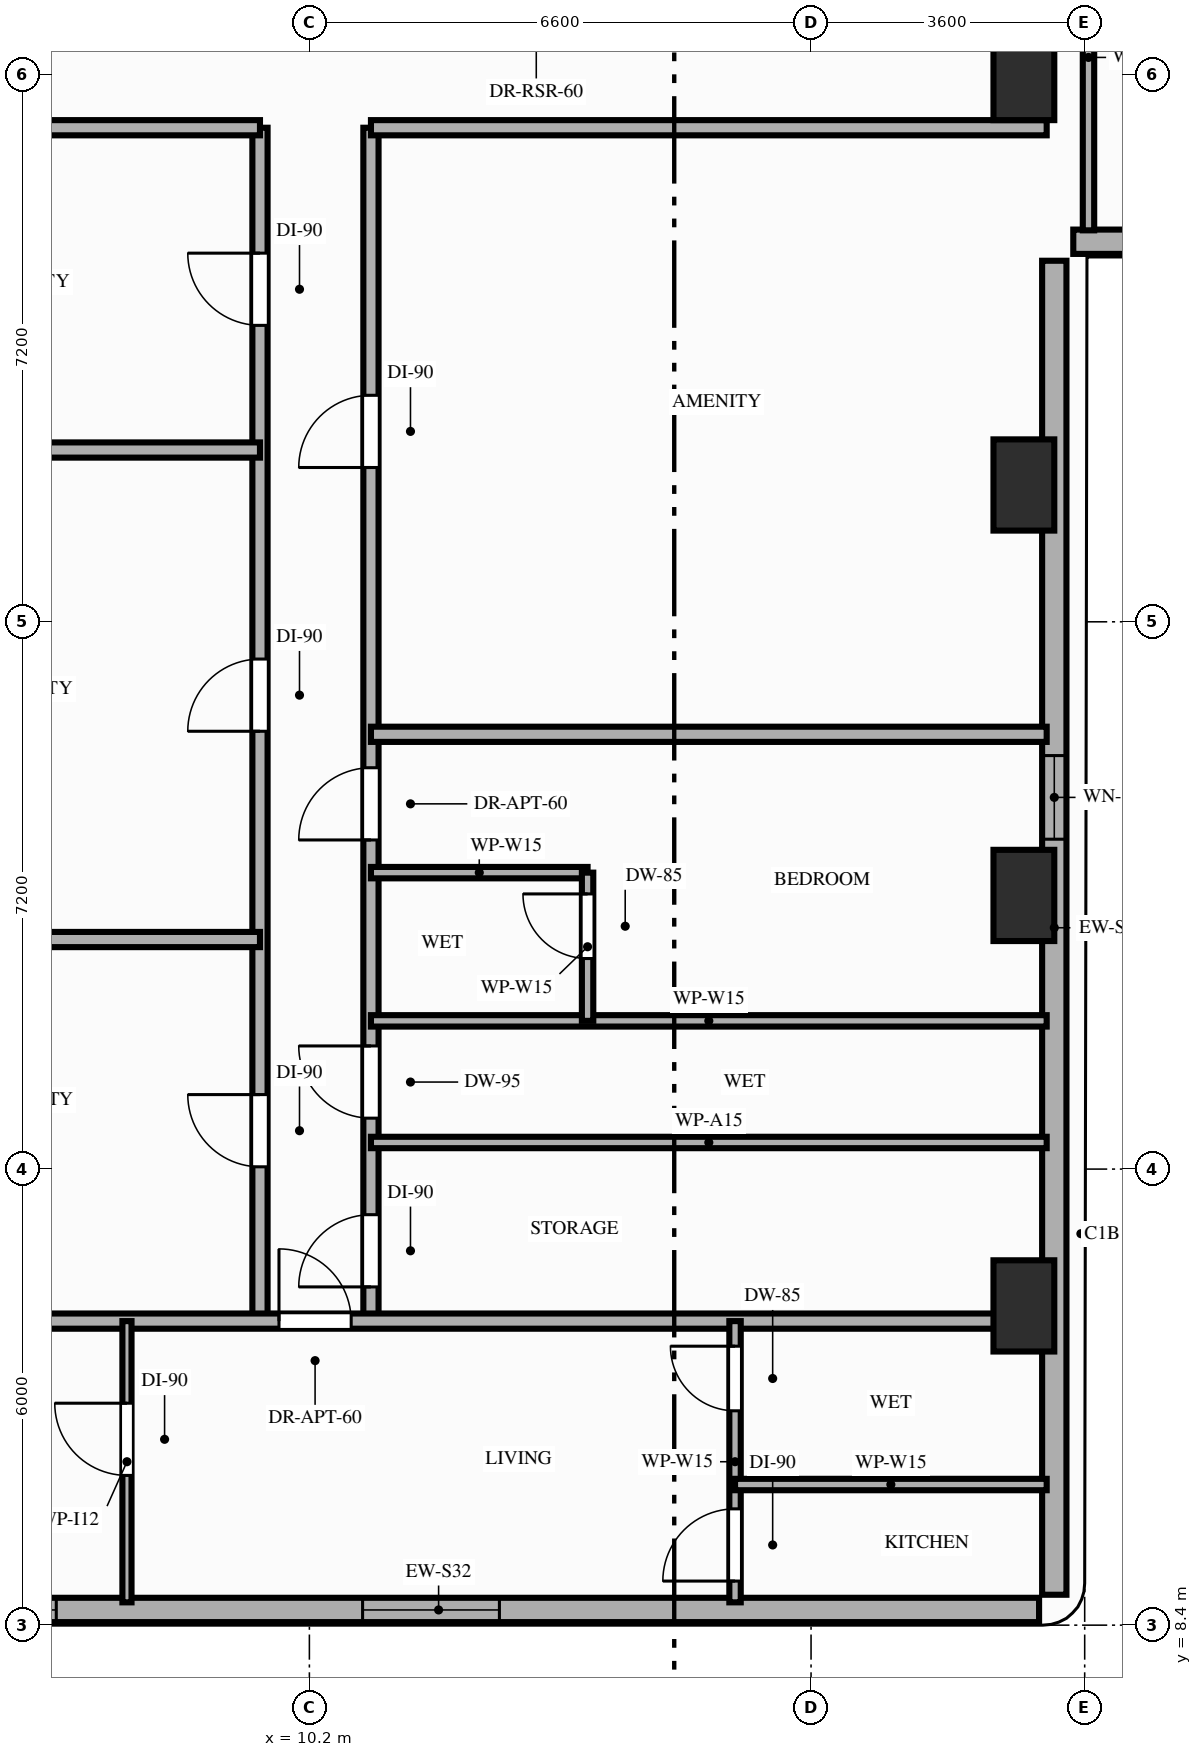
"""IFC4 building model, lengths in metres.
Left out: names, types, materials, properties, quantities, classifications, styles, units other than length and angle.
Written with IfcOpenShell. Run it as: python <this file> out.ifc"""

import sys

from ifc_helpers import new_model, si_unit, direction, frame, frame_2d, origin, origin_2d, place, context, subcontext, project, spatial, rectangle, extrude, element, fill, save


model = new_model("IFC4")
c1 = context("Model", 3, precision=1e-05, world=origin(), true_north=direction((0.0, 1.0)))
c2 = subcontext(c1, "Body", "Model", "MODEL_VIEW")
j1 = project(units=[si_unit("LENGTHUNIT", "METRE"), si_unit("PLANEANGLEUNIT", "RADIAN")], contexts=[c1])
p1 = place(None, origin())
s1 = spatial("IfcSite", under=j1, at=p1, CompositionType="ELEMENT")
p2 = place(p1, origin())
s2 = spatial("IfcBuilding", under=s1, at=p2, CompositionType="ELEMENT")
p3 = place(p2, frame((0.0, 0.0, 102.6)))
s3 = spatial("IfcBuildingStorey", under=s2, at=p3, CompositionType="ELEMENT", Elevation=102.6)
for number, where, z_axis, x_axis in (
    (1, (19.6, 12.6, 0.0), (0.0, 0.0, 1.0), (1.0, 0.0, 0.0)),
    (2, (19.6, 18.0, 0.0), (0.0, 0.0, 1.0), (1.0, 0.0, 0.0)),
    (3, (19.6, 23.4, 0.0), (0.0, 0.0, 1.0), (1.0, 0.0, 0.0)),
    (4, (19.6, 28.8, 0.0), (0.0, 0.0, 1.0), (1.0, 0.0, 0.0)),
):
    element("IfcColumn", number, at=place(p3, frame(where, z_axis=z_axis, x_axis=x_axis)), inside=s3, PredefinedType="COLUMN", context=c2, shape_type="SweptSolid", body=[
        extrude(rectangle(XDim=0.8, YDim=1.2, at=origin_2d()), origin(), (0.0, 0.0, 1.0), 4.8),
    ])
p4 = place(p3, frame((4.0, 8.6, 0.0), z_axis=(0.0, 0.0, 1.0), x_axis=(1.0, 0.0, 0.0)))
e5 = element("IfcWall", 5, at=p4, inside=s3, PredefinedType="STANDARD", context=c2, shape_type="SweptSolid", body=[
    extrude(rectangle(XDim=15.8, YDim=0.32, at=frame_2d((7.9, 0.0))), origin(), (0.0, 0.0, 1.0), 4.56),
])
p5 = place(p4, frame((1.07, 0.0, 0.85)))
e6 = element("IfcOpeningElement", 6, at=p5, cuts=e5, PredefinedType="OPENING", context=c2, shape_type="SweptSolid", body=[
    extrude(rectangle(XDim=1.8, YDim=1.75, at=frame_2d((0.9, 0.875))), frame((0.0, 0.17, 0.0), z_axis=(0.0, -1.0, 0.0), x_axis=(1.0, 0.0, 0.0)), (0.0, 0.0, 1.0), 0.34),
])
p6 = place(p4, frame((6.9, 0.0, 0.85)))
e7 = element("IfcOpeningElement", 7, at=p6, cuts=e5, PredefinedType="OPENING", context=c2, shape_type="SweptSolid", body=[
    extrude(rectangle(XDim=1.8, YDim=1.75, at=frame_2d((0.9, 0.875))), frame((0.0, 0.17, 0.0), z_axis=(0.0, -1.0, 0.0), x_axis=(1.0, 0.0, 0.0)), (0.0, 0.0, 1.0), 0.34),
])
p7 = place(p3, frame((20.0, 8.8, 0.0), z_axis=(0.0, 0.0, 1.0), x_axis=(0.0, 1.0, 0.0)))
e8 = element("IfcWall", 8, at=p7, inside=s3, PredefinedType="STANDARD", context=c2, shape_type="SweptSolid", body=[
    extrude(rectangle(XDim=17.55, YDim=0.32, at=frame_2d((8.775, 0.0))), origin(), (0.0, 0.0, 1.0), 3.95),
])
p8 = place(p7, frame((9.94, 0.0, 0.85)))
e9 = element("IfcOpeningElement", 9, at=p8, cuts=e8, PredefinedType="OPENING", context=c2, shape_type="SweptSolid", body=[
    extrude(rectangle(XDim=1.1, YDim=1.7, at=frame_2d((0.55, 0.85))), frame((0.0, 0.17, 0.0), z_axis=(0.0, -1.0, 0.0), x_axis=(1.0, 0.0, 0.0)), (0.0, 0.0, 1.0), 0.34),
])
p9 = place(p3, frame((20.25, 26.6, 0.0), z_axis=(0.0, 0.0, 1.0), x_axis=(1.0, 0.0, 0.0)))
e10 = element("IfcWall", 10, at=p9, inside=s3, PredefinedType="STANDARD", context=c2, shape_type="SweptSolid", body=[
    extrude(rectangle(XDim=26.15, YDim=0.32, at=frame_2d((13.075, 0.0))), origin(), (0.0, 0.0, 1.0), 4.26),
])
p10 = place(p9, frame((2.25, 0.0, 0.85)))
e11 = element("IfcOpeningElement", 11, at=p10, cuts=e10, PredefinedType="OPENING", context=c2, shape_type="SweptSolid", body=[
    extrude(rectangle(XDim=1.8, YDim=1.75, at=frame_2d((0.9, 0.875))), frame((0.0, 0.17, 0.0), z_axis=(0.0, -1.0, 0.0), x_axis=(1.0, 0.0, 0.0)), (0.0, 0.0, 1.0), 0.34),
])
p11 = place(p9, frame((7.75, 0.0, 0.85)))
e12 = element("IfcOpeningElement", 12, at=p11, cuts=e10, PredefinedType="OPENING", context=c2, shape_type="SweptSolid", body=[
    extrude(rectangle(XDim=1.8, YDim=1.75, at=frame_2d((0.9, 0.875))), frame((0.0, 0.17, 0.0), z_axis=(0.0, -1.0, 0.0), x_axis=(1.0, 0.0, 0.0)), (0.0, 0.0, 1.0), 0.34),
])
p12 = place(p9, frame((13.5, 0.0, 0.85)))
e13 = element("IfcOpeningElement", 13, at=p12, cuts=e10, PredefinedType="OPENING", context=c2, shape_type="SweptSolid", body=[
    extrude(rectangle(XDim=1.8, YDim=1.75, at=frame_2d((0.9, 0.875))), frame((0.0, 0.17, 0.0), z_axis=(0.0, -1.0, 0.0), x_axis=(1.0, 0.0, 0.0)), (0.0, 0.0, 1.0), 0.34),
])
p13 = place(p9, frame((22.25, 0.0, 0.85)))
e14 = element("IfcOpeningElement", 14, at=p13, cuts=e10, PredefinedType="OPENING", context=c2, shape_type="SweptSolid", body=[
    extrude(rectangle(XDim=1.8, YDim=1.75, at=frame_2d((0.9, 0.875))), frame((0.0, 0.17, 0.0), z_axis=(0.0, -1.0, 0.0), x_axis=(1.0, 0.0, 0.0)), (0.0, 0.0, 1.0), 0.34),
])
p14 = place(p3, frame((9.55, 12.4, 0.0), z_axis=(0.0, 0.0, 1.0), x_axis=(0.0, 1.0, 0.0)))
e15 = element("IfcWall", 15, at=p14, inside=s3, PredefinedType="PARTITIONING", context=c2, shape_type="SweptSolid", body=[
    extrude(rectangle(XDim=15.7, YDim=0.2, at=frame_2d((7.85, 0.0))), origin(), (0.0, 0.0, 1.0), 3.95),
])
p15 = place(p14, frame((2.03, 0.0, 0.0)))
e16 = element("IfcOpeningElement", 16, at=p15, cuts=e15, PredefinedType="OPENING", context=c2, shape_type="SweptSolid", body=[
    extrude(rectangle(XDim=0.95, YDim=2.15, at=frame_2d((0.475, 1.075))), frame((0.0, 0.11, 0.0), z_axis=(0.0, -1.0, 0.0), x_axis=(1.0, 0.0, 0.0)), (0.0, 0.0, 1.0), 0.22),
])
p16 = place(p14, frame((7.76, 0.0, 0.0)))
e17 = element("IfcOpeningElement", 17, at=p16, cuts=e15, PredefinedType="OPENING", context=c2, shape_type="SweptSolid", body=[
    extrude(rectangle(XDim=0.95, YDim=2.15, at=frame_2d((0.475, 1.075))), frame((0.0, 0.11, 0.0), z_axis=(0.0, -1.0, 0.0), x_axis=(1.0, 0.0, 0.0)), (0.0, 0.0, 1.0), 0.22),
])
p17 = place(p14, frame((13.1, 0.0, 0.0)))
e18 = element("IfcOpeningElement", 18, at=p17, cuts=e15, PredefinedType="OPENING", context=c2, shape_type="SweptSolid", body=[
    extrude(rectangle(XDim=0.95, YDim=2.15, at=frame_2d((0.475, 1.075))), frame((0.0, 0.11, 0.0), z_axis=(0.0, -1.0, 0.0), x_axis=(1.0, 0.0, 0.0)), (0.0, 0.0, 1.0), 0.22),
])
p18 = place(p3, frame((11.01, 12.4, 0.0), z_axis=(0.0, 0.0, 1.0), x_axis=(0.0, 1.0, 0.0)))
e19 = element("IfcWall", 19, at=p18, inside=s3, PredefinedType="PARTITIONING", context=c2, shape_type="SweptSolid", body=[
    extrude(rectangle(XDim=15.7, YDim=0.2, at=frame_2d((7.85, 0.0))), origin(), (0.0, 0.0, 1.0), 3.95),
])
p19 = place(p18, frame((0.45, 0.0, 0.0)))
e20 = element("IfcOpeningElement", 20, at=p19, cuts=e19, PredefinedType="OPENING", context=c2, shape_type="SweptSolid", body=[
    extrude(rectangle(XDim=0.95, YDim=2.15, at=frame_2d((0.475, 1.075))), frame((0.0, 0.11, 0.0), z_axis=(0.0, -1.0, 0.0), x_axis=(1.0, 0.0, 0.0)), (0.0, 0.0, 1.0), 0.22),
])
p20 = place(p18, frame((2.67, 0.0, 0.0)))
e21 = element("IfcOpeningElement", 21, at=p20, cuts=e19, PredefinedType="OPENING", context=c2, shape_type="SweptSolid", body=[
    extrude(rectangle(XDim=0.95, YDim=2.1, at=frame_2d((0.475, 1.05))), frame((0.0, 0.11, 0.0), z_axis=(0.0, -1.0, 0.0), x_axis=(1.0, 0.0, 0.0)), (0.0, 0.0, 1.0), 0.22),
])
p21 = place(p18, frame((11.23, 0.0, 0.0)))
e22 = element("IfcOpeningElement", 22, at=p21, cuts=e19, PredefinedType="OPENING", context=c2, shape_type="SweptSolid", body=[
    extrude(rectangle(XDim=0.95, YDim=2.15, at=frame_2d((0.475, 1.075))), frame((0.0, 0.11, 0.0), z_axis=(0.0, -1.0, 0.0), x_axis=(1.0, 0.0, 0.0)), (0.0, 0.0, 1.0), 0.22),
])
p22 = place(p18, frame((6.33, 0.0, 0.0)))
e23 = element("IfcOpeningElement", 23, at=p22, cuts=e19, PredefinedType="OPENING", context=c2, shape_type="SweptSolid", body=[
    extrude(rectangle(XDim=0.95, YDim=2.15, at=frame_2d((0.475, 1.075))), frame((0.0, 0.11, 0.0), z_axis=(0.0, -1.0, 0.0), x_axis=(1.0, 0.0, 0.0)), (0.0, 0.0, 1.0), 0.22),
])
p23 = place(p3, frame((3.9, 12.4, 0.0), z_axis=(0.0, 0.0, 1.0), x_axis=(1.0, 0.0, 0.0)))
e24 = element("IfcWall", 24, at=p23, inside=s3, PredefinedType="PARTITIONING", context=c2, shape_type="SweptSolid", body=[
    extrude(rectangle(XDim=16.0, YDim=0.2, at=frame_2d((8.0, 0.0))), origin(), (0.0, 0.0, 1.0), 3.95),
])
p24 = place(p23, frame((5.9, 0.0, 0.0)))
e25 = element("IfcOpeningElement", 25, at=p24, cuts=e24, PredefinedType="OPENING", context=c2, shape_type="SweptSolid", body=[
    extrude(rectangle(XDim=0.95, YDim=2.15, at=frame_2d((0.475, 1.075))), frame((0.0, 0.11, 0.0), z_axis=(0.0, -1.0, 0.0), x_axis=(1.0, 0.0, 0.0)), (0.0, 0.0, 1.0), 0.22),
])
p25 = place(p3, frame((3.9, 28.1, 0.0), z_axis=(0.0, 0.0, 1.0), x_axis=(1.0, 0.0, 0.0)))
e26 = element("IfcWall", 26, at=p25, inside=s3, PredefinedType="PARTITIONING", context=c2, shape_type="SweptSolid", body=[
    extrude(rectangle(XDim=5.65, YDim=0.2, at=frame_2d((2.825, 0.0))), origin(), (0.0, 0.0, 1.0), 3.95),
])
p26 = place(p3, frame((11.01, 28.1, 0.0), z_axis=(0.0, 0.0, 1.0), x_axis=(1.0, 0.0, 0.0)))
e27 = element("IfcWall", 27, at=p26, inside=s3, PredefinedType="PARTITIONING", context=c2, shape_type="SweptSolid", body=[
    extrude(rectangle(XDim=8.89, YDim=0.2, at=frame_2d((4.445, 0.0))), origin(), (0.0, 0.0, 1.0), 3.95),
])
for number, where, z_axis, x_axis in (
    (28, (3.9, 17.42, 0.0), (0.0, 0.0, 1.0), (1.0, 0.0, 0.0)),
    (29, (3.9, 23.86, 0.0), (0.0, 0.0, 1.0), (1.0, 0.0, 0.0)),
):
    element("IfcWall", number, at=place(p3, frame(where, z_axis=z_axis, x_axis=x_axis)), inside=s3, PredefinedType="PARTITIONING", context=c2, shape_type="SweptSolid", body=[
        extrude(rectangle(XDim=5.65, YDim=0.2, at=frame_2d((2.825, 0.0))), origin(), (0.0, 0.0, 1.0), 3.95),
    ])
p27 = place(p3, frame((7.8, 8.7, 0.0), z_axis=(0.0, 0.0, 1.0), x_axis=(0.0, 1.0, 0.0)))
e30 = element("IfcWall", 30, at=p27, inside=s3, PredefinedType="PARTITIONING", context=c2, shape_type="SweptSolid", body=[
    extrude(rectangle(XDim=3.7, YDim=0.12, at=frame_2d((1.85, 0.0))), origin(), (0.0, 0.0, 1.0), 3.95),
])
p28 = place(p27, frame((1.67, 0.0, 0.0)))
e31 = element("IfcOpeningElement", 31, at=p28, cuts=e30, PredefinedType="OPENING", context=c2, shape_type="SweptSolid", body=[
    extrude(rectangle(XDim=0.95, YDim=2.15, at=frame_2d((0.475, 1.075))), frame((0.0, 0.07, 0.0), z_axis=(0.0, -1.0, 0.0), x_axis=(1.0, 0.0, 0.0)), (0.0, 0.0, 1.0), 0.14),
])
p29 = place(p3, frame((15.8, 8.7, 0.0), z_axis=(0.0, 0.0, 1.0), x_axis=(0.0, 1.0, 0.0)))
e32 = element("IfcWall", 32, at=p29, inside=s3, PredefinedType="PARTITIONING", context=c2, shape_type="SweptSolid", body=[
    extrude(rectangle(XDim=3.7, YDim=0.15, at=frame_2d((1.85, 0.0))), origin(), (0.0, 0.0, 1.0), 3.95),
])
p30 = place(p29, frame((0.28, 0.0, 0.0)))
e33 = element("IfcOpeningElement", 33, at=p30, cuts=e32, PredefinedType="OPENING", context=c2, shape_type="SweptSolid", body=[
    extrude(rectangle(XDim=0.95, YDim=2.15, at=frame_2d((0.475, 1.075))), frame((0.0, 0.085, 0.0), z_axis=(0.0, -1.0, 0.0), x_axis=(1.0, 0.0, 0.0)), (0.0, 0.0, 1.0), 0.17),
])
p31 = place(p29, frame((2.52, 0.0, 0.0)))
e34 = element("IfcOpeningElement", 34, at=p31, cuts=e32, PredefinedType="OPENING", context=c2, shape_type="SweptSolid", body=[
    extrude(rectangle(XDim=0.85, YDim=2.1, at=frame_2d((0.425, 1.05))), frame((0.0, 0.085, 0.0), z_axis=(0.0, -1.0, 0.0), x_axis=(1.0, 0.0, 0.0)), (0.0, 0.0, 1.0), 0.17),
])
p32 = place(p3, frame((15.8, 10.25, 0.0), z_axis=(0.0, 0.0, 1.0), x_axis=(1.0, 0.0, 0.0)))
e35 = element("IfcWall", 35, at=p32, inside=s3, PredefinedType="PARTITIONING", context=c2, shape_type="SweptSolid", body=[
    extrude(rectangle(XDim=4.1, YDim=0.15, at=frame_2d((2.05, 0.0))), origin(), (0.0, 0.0, 1.0), 4.56),
])
for number, where, z_axis, x_axis in (
    (36, (11.01, 14.75, 0.0), (0.0, 0.0, 1.0), (1.0, 0.0, 0.0)),
    (37, (11.01, 16.35, 0.0), (0.0, 0.0, 1.0), (1.0, 0.0, 0.0)),
):
    element("IfcWall", number, at=place(p3, frame(where, z_axis=z_axis, x_axis=x_axis)), inside=s3, PredefinedType="PARTITIONING", context=c2, shape_type="SweptSolid", body=[
        extrude(rectangle(XDim=8.89, YDim=0.15, at=frame_2d((4.445, 0.0))), origin(), (0.0, 0.0, 1.0), 3.95),
    ])
p33 = place(p3, frame((11.01, 20.12, 0.0), z_axis=(0.0, 0.0, 1.0), x_axis=(1.0, 0.0, 0.0)))
e38 = element("IfcWall", 38, at=p33, inside=s3, PredefinedType="PARTITIONING", context=c2, shape_type="SweptSolid", body=[
    extrude(rectangle(XDim=8.89, YDim=0.2, at=frame_2d((4.445, 0.0))), origin(), (0.0, 0.0, 1.0), 3.95),
])
p34 = place(p3, frame((11.01, 18.3, 0.0), z_axis=(0.0, 0.0, 1.0), x_axis=(1.0, 0.0, 0.0)))
e39 = element("IfcWall", 39, at=p34, inside=s3, PredefinedType="PARTITIONING", context=c2, shape_type="SweptSolid", body=[
    extrude(rectangle(XDim=2.85, YDim=0.15, at=frame_2d((1.425, 0.0))), origin(), (0.0, 0.0, 1.0), 3.95),
])
p35 = place(p3, frame((13.86, 16.35, 0.0), z_axis=(0.0, 0.0, 1.0), x_axis=(0.0, 1.0, 0.0)))
e40 = element("IfcWall", 40, at=p35, inside=s3, PredefinedType="PARTITIONING", context=c2, shape_type="SweptSolid", body=[
    extrude(rectangle(XDim=1.95, YDim=0.15, at=frame_2d((0.975, 0.0))), origin(), (0.0, 0.0, 1.0), 3.95),
])
p36 = place(p35, frame((0.82, 0.0, 0.0)))
e41 = element("IfcOpeningElement", 41, at=p36, cuts=e40, PredefinedType="OPENING", context=c2, shape_type="SweptSolid", body=[
    extrude(rectangle(XDim=0.85, YDim=2.1, at=frame_2d((0.425, 1.05))), frame((0.0, 0.085, 0.0), z_axis=(0.0, -1.0, 0.0), x_axis=(1.0, 0.0, 0.0)), (0.0, 0.0, 1.0), 0.17),
])
p37 = place(p3, frame((20.45, 26.75, 0.0), z_axis=(0.0, 0.0, 1.0), x_axis=(0.0, 1.0, 0.0)))
e42 = element("IfcWall", 42, at=p37, inside=s3, PredefinedType="PARTITIONING", context=c2, shape_type="SweptSolid", body=[
    extrude(rectangle(XDim=4.55, YDim=0.15, at=frame_2d((2.275, 0.0))), origin(), (0.0, 0.0, 1.0), 3.95),
])
p38 = place(p5, origin())
e43 = element("IfcWindow", 43, at=p38, inside=s3, PartitioningType="SINGLE_PANEL", PredefinedType="WINDOW", context=c2, shape_type="SweptSolid", body=[
    extrude(rectangle(XDim=1.8, YDim=1.75, at=frame_2d((0.9, 0.875))), frame((0.0, 0.03, 0.0), z_axis=(0.0, -1.0, 0.0), x_axis=(1.0, 0.0, 0.0)), (0.0, 0.0, 1.0), 0.06),
])
fill(e6, e43)
p39 = place(p6, origin())
e44 = element("IfcWindow", 44, at=p39, inside=s3, PartitioningType="SINGLE_PANEL", PredefinedType="WINDOW", context=c2, shape_type="SweptSolid", body=[
    extrude(rectangle(XDim=1.8, YDim=1.75, at=frame_2d((0.9, 0.875))), frame((0.0, 0.03, 0.0), z_axis=(0.0, -1.0, 0.0), x_axis=(1.0, 0.0, 0.0)), (0.0, 0.0, 1.0), 0.06),
])
fill(e7, e44)
p40 = place(p8, origin())
e45 = element("IfcWindow", 45, at=p40, inside=s3, PartitioningType="SINGLE_PANEL", PredefinedType="WINDOW", context=c2, shape_type="SweptSolid", body=[
    extrude(rectangle(XDim=1.1, YDim=1.7, at=frame_2d((0.55, 0.85))), frame((0.0, 0.03, 0.0), z_axis=(0.0, -1.0, 0.0), x_axis=(1.0, 0.0, 0.0)), (0.0, 0.0, 1.0), 0.06),
])
fill(e9, e45)
p41 = place(p15, origin())
e46 = element("IfcDoor", 46, at=p41, inside=s3, OperationType="SINGLE_SWING_RIGHT", PredefinedType="DOOR", context=c2, shape_type="SweptSolid", body=[
    extrude(rectangle(XDim=0.95, YDim=2.15, at=frame_2d((0.475, 1.075))), frame((0.0, 0.025, 0.0), z_axis=(0.0, -1.0, 0.0), x_axis=(1.0, 0.0, 0.0)), (0.0, 0.0, 1.0), 0.05),
])
fill(e16, e46)
p42 = place(p16, origin())
e47 = element("IfcDoor", 47, at=p42, inside=s3, OperationType="SINGLE_SWING_LEFT", PredefinedType="DOOR", context=c2, shape_type="SweptSolid", body=[
    extrude(rectangle(XDim=0.95, YDim=2.15, at=frame_2d((0.475, 1.075))), frame((0.0, 0.025, 0.0), z_axis=(0.0, -1.0, 0.0), x_axis=(1.0, 0.0, 0.0)), (0.0, 0.0, 1.0), 0.05),
])
fill(e17, e47)
p43 = place(p17, origin())
e48 = element("IfcDoor", 48, at=p43, inside=s3, OperationType="SINGLE_SWING_RIGHT", PredefinedType="DOOR", context=c2, shape_type="SweptSolid", body=[
    extrude(rectangle(XDim=0.95, YDim=2.15, at=frame_2d((0.475, 1.075))), frame((0.0, 0.025, 0.0), z_axis=(0.0, -1.0, 0.0), x_axis=(1.0, 0.0, 0.0)), (0.0, 0.0, 1.0), 0.05),
])
fill(e18, e48)
p44 = place(p24, origin())
e49 = element("IfcDoor", 49, at=p44, inside=s3, OperationType="SINGLE_SWING_LEFT", PredefinedType="DOOR", context=c2, shape_type="SweptSolid", body=[
    extrude(rectangle(XDim=0.95, YDim=2.15, at=frame_2d((0.475, 1.075))), frame((0.0, 0.025, 0.0), z_axis=(0.0, -1.0, 0.0), x_axis=(1.0, 0.0, 0.0)), (0.0, 0.0, 1.0), 0.05),
])
fill(e25, e49)
p45 = place(p28, origin())
e50 = element("IfcDoor", 50, at=p45, inside=s3, OperationType="SINGLE_SWING_RIGHT", PredefinedType="DOOR", context=c2, shape_type="SweptSolid", body=[
    extrude(rectangle(XDim=0.95, YDim=2.15, at=frame_2d((0.475, 1.075))), frame((0.0, 0.025, 0.0), z_axis=(0.0, -1.0, 0.0), x_axis=(1.0, 0.0, 0.0)), (0.0, 0.0, 1.0), 0.05),
])
fill(e31, e50)
p46 = place(p30, origin())
e51 = element("IfcDoor", 51, at=p46, inside=s3, OperationType="SINGLE_SWING_LEFT", PredefinedType="DOOR", context=c2, shape_type="SweptSolid", body=[
    extrude(rectangle(XDim=0.95, YDim=2.15, at=frame_2d((0.475, 1.075))), frame((0.0, 0.025, 0.0), z_axis=(0.0, -1.0, 0.0), x_axis=(1.0, 0.0, 0.0)), (0.0, 0.0, 1.0), 0.05),
])
fill(e33, e51)
p47 = place(p31, origin())
e52 = element("IfcDoor", 52, at=p47, inside=s3, OperationType="SINGLE_SWING_RIGHT", PredefinedType="DOOR", context=c2, shape_type="SweptSolid", body=[
    extrude(rectangle(XDim=0.85, YDim=2.1, at=frame_2d((0.425, 1.05))), frame((0.0, 0.025, 0.0), z_axis=(0.0, -1.0, 0.0), x_axis=(1.0, 0.0, 0.0)), (0.0, 0.0, 1.0), 0.05),
])
fill(e34, e52)
p48 = place(p19, origin())
e53 = element("IfcDoor", 53, at=p48, inside=s3, OperationType="SINGLE_SWING_LEFT", PredefinedType="DOOR", context=c2, shape_type="SweptSolid", body=[
    extrude(rectangle(XDim=0.95, YDim=2.15, at=frame_2d((0.475, 1.075))), frame((0.0, 0.025, 0.0), z_axis=(0.0, -1.0, 0.0), x_axis=(1.0, 0.0, 0.0)), (0.0, 0.0, 1.0), 0.05),
])
fill(e20, e53)
p49 = place(p20, origin())
e54 = element("IfcDoor", 54, at=p49, inside=s3, OperationType="SINGLE_SWING_RIGHT", PredefinedType="DOOR", context=c2, shape_type="SweptSolid", body=[
    extrude(rectangle(XDim=0.95, YDim=2.1, at=frame_2d((0.475, 1.05))), frame((0.0, 0.025, 0.0), z_axis=(0.0, -1.0, 0.0), x_axis=(1.0, 0.0, 0.0)), (0.0, 0.0, 1.0), 0.05),
])
fill(e21, e54)
p50 = place(p21, origin())
e55 = element("IfcDoor", 55, at=p50, inside=s3, OperationType="SINGLE_SWING_LEFT", PredefinedType="DOOR", context=c2, shape_type="SweptSolid", body=[
    extrude(rectangle(XDim=0.95, YDim=2.15, at=frame_2d((0.475, 1.075))), frame((0.0, 0.025, 0.0), z_axis=(0.0, -1.0, 0.0), x_axis=(1.0, 0.0, 0.0)), (0.0, 0.0, 1.0), 0.05),
])
fill(e22, e55)
p51 = place(p36, origin())
e56 = element("IfcDoor", 56, at=p51, inside=s3, OperationType="SINGLE_SWING_RIGHT", PredefinedType="DOOR", context=c2, shape_type="SweptSolid", body=[
    extrude(rectangle(XDim=0.85, YDim=2.1, at=frame_2d((0.425, 1.05))), frame((0.0, 0.025, 0.0), z_axis=(0.0, -1.0, 0.0), x_axis=(1.0, 0.0, 0.0)), (0.0, 0.0, 1.0), 0.05),
])
fill(e41, e56)
p52 = place(p22, origin())
e57 = element("IfcDoor", 57, at=p52, inside=s3, OperationType="SINGLE_SWING_LEFT", PredefinedType="DOOR", context=c2, shape_type="SweptSolid", body=[
    extrude(rectangle(XDim=0.95, YDim=2.15, at=frame_2d((0.475, 1.075))), frame((0.0, 0.025, 0.0), z_axis=(0.0, -1.0, 0.0), x_axis=(1.0, 0.0, 0.0)), (0.0, 0.0, 1.0), 0.05),
])
fill(e23, e57)
save(model, sys.argv[1])
